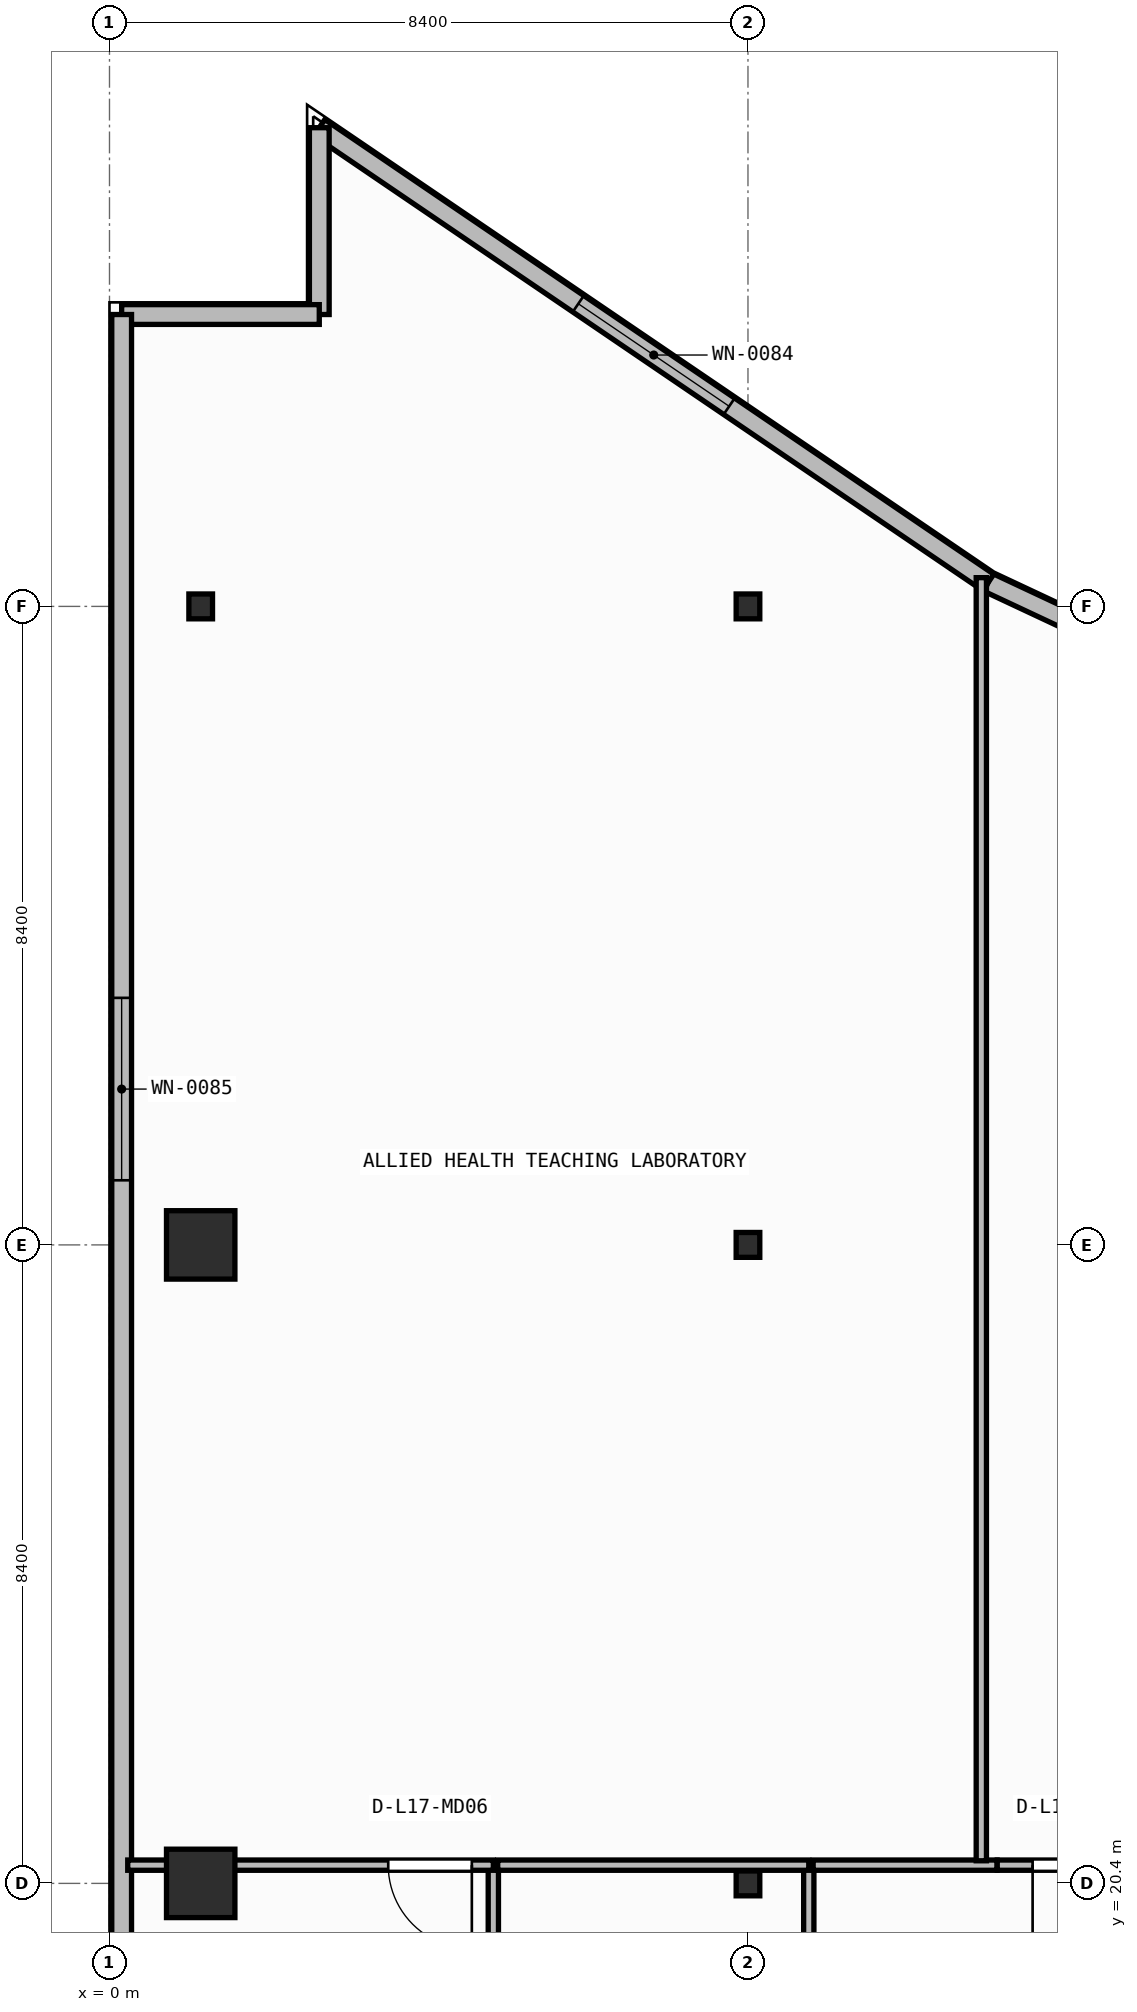
"""IFC4 building model, lengths in metres.
Left out: names, types, materials, properties, quantities, classifications, styles, units other than length and angle.
Written with IfcOpenShell. Run it as: python <this file> out.ifc"""

import sys

from ifc_helpers import new_model, si_unit, direction, frame, frame_2d, origin, origin_2d, place, context, subcontext, project, spatial, rectangle, i_section, extrude, element, fill, save


model = new_model("IFC4")
c1 = context("Model", 3, precision=1e-05, world=origin(), true_north=direction((0.0, 1.0)))
c2 = subcontext(c1, "Body", "Model", "MODEL_VIEW")
j1 = project(units=[si_unit("LENGTHUNIT", "METRE"), si_unit("PLANEANGLEUNIT", "RADIAN")], contexts=[c1])
p1 = place(None, origin())
s1 = spatial("IfcSite", under=j1, at=p1, CompositionType="ELEMENT")
p2 = place(p1, origin())
s2 = spatial("IfcBuilding", under=s1, at=p2, CompositionType="ELEMENT")
p3 = place(p2, frame((0.0, 0.0, 69.9)))
s3 = spatial("IfcBuildingStorey", under=s2, at=p3, CompositionType="ELEMENT", Elevation=69.9)
p4 = place(p3, frame((1.2, 20.4, 0.0), z_axis=(0.0, 0.0, 1.0), x_axis=(1.0, 0.0, 0.0)))
e1 = element("IfcColumn", 1, at=p4, inside=s3, PredefinedType="COLUMN", context=c2, shape_type="SweptSolid", body=[
    extrude(rectangle(XDim=0.9, YDim=0.9, at=origin_2d()), origin(), (0.0, 0.0, 1.0), 3.95),
])
p5 = place(p3, frame((8.4, 20.4, 0.0), z_axis=(0.0, 0.0, 1.0), x_axis=(1.0, 0.0, 0.0)))
e2 = element("IfcColumn", 2, at=p5, inside=s3, PredefinedType="COLUMN", context=c2, shape_type="SweptSolid", body=[
    extrude(i_section(OverallWidth=0.311, OverallDepth=0.327, WebThickness=0.016, FlangeThickness=0.025, FilletRadius=0.017, at=origin_2d()), origin(), (0.0, 0.0, 1.0), 3.95),
])
p6 = place(p3, frame((1.2, 28.8, 0.0), z_axis=(0.0, 0.0, 1.0), x_axis=(1.0, 0.0, 0.0)))
e3 = element("IfcColumn", 3, at=p6, inside=s3, PredefinedType="COLUMN", context=c2, shape_type="SweptSolid", body=[
    extrude(rectangle(XDim=0.9, YDim=0.9, at=origin_2d()), origin(), (0.0, 0.0, 1.0), 3.95),
])
for number, where, z_axis, x_axis in (
    (4, (8.4, 28.8, 0.0), (0.0, 0.0, 1.0), (1.0, 0.0, 0.0)),
    (5, (1.2, 37.2, 0.0), (0.0, 0.0, 1.0), (1.0, 0.0, 0.0)),
    (6, (8.4, 37.2, 0.0), (0.0, 0.0, 1.0), (1.0, 0.0, 0.0)),
):
    element("IfcColumn", number, at=place(p3, frame(where, z_axis=z_axis, x_axis=x_axis)), inside=s3, PredefinedType="COLUMN", context=c2, shape_type="SweptSolid", body=[
        extrude(i_section(OverallWidth=0.311, OverallDepth=0.327, WebThickness=0.016, FlangeThickness=0.025, FilletRadius=0.017, at=origin_2d()), origin(), (0.0, 0.0, 1.0), 3.95),
    ])
p7 = place(p3, frame((24.408, 31.492, 0.0), z_axis=(0.0, 0.0, 1.0), x_axis=(-0.905396522918, 0.424566998585, 0.0)))
e7 = element("IfcWall", 7, at=p7, inside=s3, PredefinedType="STANDARD", context=c2, shape_type="SweptSolid", body=[
    extrude(rectangle(XDim=14.189, YDim=0.26, at=frame_2d((7.095, 0.0))), origin(), (0.0, 0.0, 1.0), 3.71),
])
p8 = place(p7, frame((5.895, 0.0, 0.9)))
e8 = element("IfcOpeningElement", 8, at=p8, cuts=e7, PredefinedType="OPENING", context=c2, shape_type="SweptSolid", body=[
    extrude(rectangle(XDim=2.4, YDim=1.65, at=frame_2d((1.2, 0.825))), frame((0.0, 0.14, 0.0), z_axis=(0.0, -1.0, 0.0), x_axis=(1.0, 0.0, 0.0)), (0.0, 0.0, 1.0), 0.28),
])
p9 = place(p3, frame((11.561, 37.517, 0.0), z_axis=(0.0, 0.0, 1.0), x_axis=(-0.827064743936, 0.562106670782, 0.0)))
e9 = element("IfcWall", 9, at=p9, inside=s3, PredefinedType="STANDARD", context=c2, shape_type="SweptSolid", body=[
    extrude(rectangle(XDim=10.641, YDim=0.26, at=frame_2d((5.32, 0.0))), origin(), (0.0, 0.0, 1.0), 3.71),
])
p10 = place(p9, frame((4.12, 0.0, 0.9)))
e10 = element("IfcOpeningElement", 10, at=p10, cuts=e9, PredefinedType="OPENING", context=c2, shape_type="SweptSolid", body=[
    extrude(rectangle(XDim=2.4, YDim=1.65, at=frame_2d((1.2, 0.825))), frame((0.0, 0.14, 0.0), z_axis=(0.0, -1.0, 0.0), x_axis=(1.0, 0.0, 0.0)), (0.0, 0.0, 1.0), 0.28),
])
p11 = place(p3, frame((2.76, 43.498, 0.0), z_axis=(0.0, 0.0, 1.0), x_axis=(0.0, -1.0, 0.0)))
e11 = element("IfcWall", 11, at=p11, inside=s3, PredefinedType="STANDARD", context=c2, shape_type="SweptSolid", body=[
    extrude(rectangle(XDim=2.458, YDim=0.26, at=frame_2d((1.229, 0.0))), origin(), (0.0, 0.0, 1.0), 3.71),
])
p12 = place(p3, frame((2.76, 41.04, 0.0), z_axis=(0.0, 0.0, 1.0), x_axis=(-1.0, 0.0, 0.0)))
e12 = element("IfcWall", 12, at=p12, inside=s3, PredefinedType="STANDARD", context=c2, shape_type="SweptSolid", body=[
    extrude(rectangle(XDim=2.6, YDim=0.26, at=frame_2d((1.3, 0.0))), origin(), (0.0, 0.0, 1.0), 3.71),
])
p13 = place(p3, frame((0.16, 41.04, 0.0), z_axis=(0.0, 0.0, 1.0), x_axis=(0.0, -1.0, 0.0)))
e13 = element("IfcWall", 13, at=p13, inside=s3, PredefinedType="STANDARD", context=c2, shape_type="SweptSolid", body=[
    extrude(rectangle(XDim=38.28, YDim=0.26, at=frame_2d((19.14, 0.0))), origin(), (0.0, 0.0, 1.0), 3.71),
])
p14 = place(p13, frame((8.99, 0.0, 0.9)))
e14 = element("IfcOpeningElement", 14, at=p14, cuts=e13, PredefinedType="OPENING", context=c2, shape_type="SweptSolid", body=[
    extrude(rectangle(XDim=2.4, YDim=1.65, at=frame_2d((1.2, 0.825))), frame((0.0, 0.14, 0.0), z_axis=(0.0, -1.0, 0.0), x_axis=(1.0, 0.0, 0.0)), (0.0, 0.0, 1.0), 0.28),
])
p15 = place(p3, frame((5.05, 17.14, 0.0), z_axis=(0.0, 0.0, 1.0), x_axis=(0.0, 1.0, 0.0)))
e15 = element("IfcWall", 15, at=p15, inside=s3, PredefinedType="PARTITIONING", context=c2, shape_type="SweptSolid", body=[
    extrude(rectangle(XDim=3.5, YDim=0.135, at=frame_2d((1.75, 0.0))), origin(), (0.0, 0.0, 1.0), 3.71),
])
p16 = place(p3, frame((5.05, 20.64, 0.0), z_axis=(0.0, 0.0, 1.0), x_axis=(-1.0, 0.0, 0.0)))
e16 = element("IfcWall", 16, at=p16, inside=s3, PredefinedType="PARTITIONING", context=c2, shape_type="SweptSolid", body=[
    extrude(rectangle(XDim=4.81, YDim=0.135, at=frame_2d((2.405, 0.0))), origin(), (0.0, 0.0, 1.0), 3.073),
])
p17 = place(p16, frame((0.283, 0.0, 0.0)))
e17 = element("IfcOpeningElement", 17, at=p17, cuts=e16, PredefinedType="OPENING", context=c2, shape_type="SweptSolid", body=[
    extrude(rectangle(XDim=1.1, YDim=2.1, at=frame_2d((0.55, 1.05))), frame((0.0, 0.077, 0.0), z_axis=(0.0, -1.0, 0.0), x_axis=(1.0, 0.0, 0.0)), (0.0, 0.0, 1.0), 0.155),
])
p18 = place(p3, frame((9.2, 17.833, 0.0), z_axis=(0.0, 0.0, 1.0), x_axis=(0.0, 1.0, 0.0)))
e18 = element("IfcWall", 18, at=p18, inside=s3, PredefinedType="PARTITIONING", context=c2, shape_type="SweptSolid", body=[
    extrude(rectangle(XDim=2.807, YDim=0.135, at=frame_2d((1.404, 0.0))), origin(), (0.0, 0.0, 1.0), 3.71),
])
p19 = place(p3, frame((9.2, 20.64, 0.0), z_axis=(0.0, 0.0, 1.0), x_axis=(-1.0, 0.0, 0.0)))
e19 = element("IfcWall", 19, at=p19, inside=s3, PredefinedType="PARTITIONING", context=c2, shape_type="SweptSolid", body=[
    extrude(rectangle(XDim=4.093, YDim=0.135, at=frame_2d((2.046, 0.0))), origin(), (0.0, 0.0, 1.0), 3.073),
])
p20 = place(p3, frame((11.677, 20.64, 0.0), z_axis=(0.0, 0.0, 1.0), x_axis=(-1.0, 0.0, 0.0)))
e20 = element("IfcWall", 20, at=p20, inside=s3, PredefinedType="PARTITIONING", context=c2, shape_type="SweptSolid", body=[
    extrude(rectangle(XDim=2.42, YDim=0.135, at=frame_2d((1.21, 0.0))), origin(), (0.0, 0.0, 1.0), 3.073),
])
p21 = place(p3, frame((13.71, 20.64, 0.0), z_axis=(0.0, 0.0, 1.0), x_axis=(-1.0, 0.0, 0.0)))
e21 = element("IfcWall", 21, at=p21, inside=s3, PredefinedType="PARTITIONING", context=c2, shape_type="SweptSolid", body=[
    extrude(rectangle(XDim=2.031, YDim=0.135, at=frame_2d((1.015, 0.0))), origin(), (0.0, 0.0, 1.0), 3.073),
])
p22 = place(p21, frame((0.465, 0.0, 0.0)))
e22 = element("IfcOpeningElement", 22, at=p22, cuts=e21, PredefinedType="OPENING", context=c2, shape_type="SweptSolid", body=[
    extrude(rectangle(XDim=1.1, YDim=2.1, at=frame_2d((0.55, 1.05))), frame((0.0, 0.077, 0.0), z_axis=(0.0, -1.0, 0.0), x_axis=(1.0, 0.0, 0.0)), (0.0, 0.0, 1.0), 0.155),
])
p23 = place(p3, frame((11.47, 20.698, 0.0), z_axis=(0.0, 0.0, 1.0), x_axis=(0.0, 1.0, 0.0)))
e23 = element("IfcWall", 23, at=p23, inside=s3, PredefinedType="PARTITIONING", context=c2, shape_type="SweptSolid", body=[
    extrude(rectangle(XDim=16.881, YDim=0.135, at=frame_2d((8.44, 0.0))), origin(), (0.0, 0.0, 1.0), 3.71),
])
p24 = place(p10, origin())
e24 = element("IfcWindow", 24, at=p24, inside=s3, PartitioningType="SINGLE_PANEL", PredefinedType="WINDOW", context=c2, shape_type="SweptSolid", body=[
    extrude(rectangle(XDim=2.4, YDim=1.65, at=frame_2d((1.2, 0.825))), frame((0.0, 0.03, 0.0), z_axis=(0.0, -1.0, 0.0), x_axis=(1.0, 0.0, 0.0)), (0.0, 0.0, 1.0), 0.06),
])
fill(e10, e24)
p25 = place(p14, origin())
e25 = element("IfcWindow", 25, at=p25, inside=s3, PartitioningType="SINGLE_PANEL", PredefinedType="WINDOW", context=c2, shape_type="SweptSolid", body=[
    extrude(rectangle(XDim=2.4, YDim=1.65, at=frame_2d((1.2, 0.825))), frame((0.0, 0.03, 0.0), z_axis=(0.0, -1.0, 0.0), x_axis=(1.0, 0.0, 0.0)), (0.0, 0.0, 1.0), 0.06),
])
fill(e14, e25)
p26 = place(p17, origin())
e26 = element("IfcDoor", 26, at=p26, inside=s3, OperationType="SINGLE_SWING_LEFT", PredefinedType="DOOR", context=c2, shape_type="SweptSolid", body=[
    extrude(rectangle(XDim=1.1, YDim=2.1, at=frame_2d((0.55, 1.05))), frame((0.0, 0.025, 0.0), z_axis=(0.0, -1.0, 0.0), x_axis=(1.0, 0.0, 0.0)), (0.0, 0.0, 1.0), 0.05),
])
fill(e17, e26)
p27 = place(p22, origin())
e27 = element("IfcDoor", 27, at=p27, inside=s3, OperationType="SINGLE_SWING_RIGHT", PredefinedType="DOOR", context=c2, shape_type="SweptSolid", body=[
    extrude(rectangle(XDim=1.1, YDim=2.1, at=frame_2d((0.55, 1.05))), frame((0.0, 0.025, 0.0), z_axis=(0.0, -1.0, 0.0), x_axis=(1.0, 0.0, 0.0)), (0.0, 0.0, 1.0), 0.05),
])
fill(e22, e27)
save(model, sys.argv[1])
